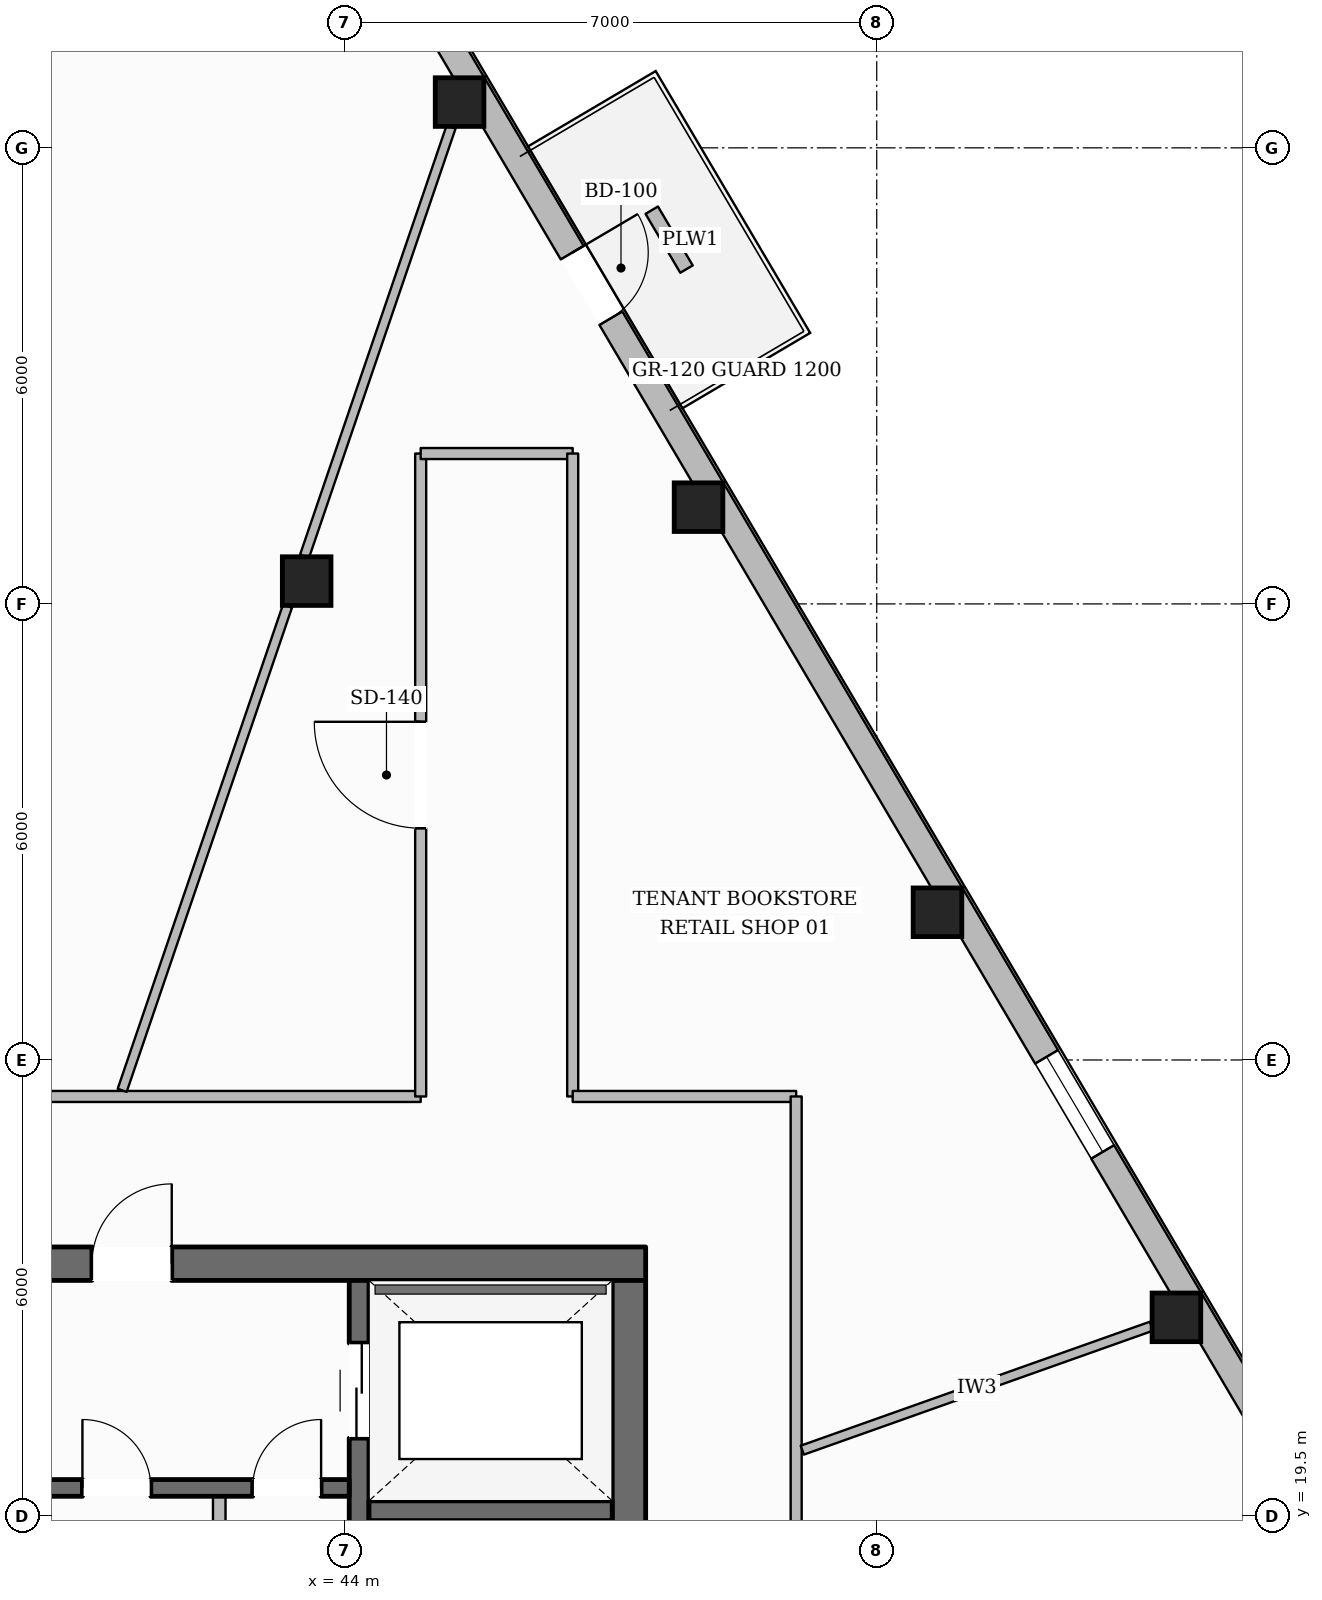
"""IFC4 building model, lengths in metres.
Left out: names, types, materials, properties, quantities, classifications, styles, units other than length and angle.
Written with IfcOpenShell. Run it as: python <this file> out.ifc"""

import sys

from ifc_helpers import new_model, si_unit, direction, frame, frame_2d, origin, origin_2d, place, context, subcontext, project, spatial, rectangle, hollow_rectangle, extrude, element, fill, save


model = new_model("IFC4")
c1 = context("Model", 3, precision=1e-05, world=origin(), true_north=direction((0.0, 1.0)))
c2 = subcontext(c1, "Body", "Model", "MODEL_VIEW")
j1 = project(units=[si_unit("LENGTHUNIT", "METRE"), si_unit("PLANEANGLEUNIT", "RADIAN")], contexts=[c1])
p1 = place(None, origin())
s1 = spatial("IfcSite", under=j1, at=p1, CompositionType="ELEMENT")
p2 = place(p1, origin())
s2 = spatial("IfcBuilding", under=s1, at=p2, CompositionType="ELEMENT")
p3 = place(p2, frame((0.0, 0.0, 199.65)))
s3 = spatial("IfcBuildingStorey", under=s2, at=p3, CompositionType="ELEMENT", Elevation=199.65)
p4 = place(p3, frame((28.04, 22.82, 0.0), z_axis=(0.0, 0.0, 1.0), x_axis=(1.0, 0.0, 0.0)))
e1 = element("IfcWall", 1, at=p4, inside=s3, PredefinedType="SOLIDWALL", context=c2, shape_type="SweptSolid", body=[
    extrude(rectangle(XDim=19.92, YDim=0.44, at=frame_2d((9.96, 0.0))), origin(), (0.0, 0.0, 1.0), 3.6),
])
p5 = place(p4, frame((6.235, 0.0, 0.0)))
e2 = element("IfcOpeningElement", 2, at=p5, cuts=e1, PredefinedType="OPENING", context=c2, shape_type="SweptSolid", body=[
    extrude(rectangle(XDim=1.05, YDim=2.15, at=frame_2d((0.525, 1.075))), frame((0.0, 0.23, 0.0), z_axis=(0.0, -1.0, 0.0), x_axis=(1.0, 0.0, 0.0)), (0.0, 0.0, 1.0), 0.46),
])
p6 = place(p4, frame((12.635, 0.0, 0.0)))
e3 = element("IfcOpeningElement", 3, at=p6, cuts=e1, PredefinedType="OPENING", context=c2, shape_type="SweptSolid", body=[
    extrude(rectangle(XDim=1.05, YDim=2.15, at=frame_2d((0.525, 1.075))), frame((0.0, 0.23, 0.0), z_axis=(0.0, -1.0, 0.0), x_axis=(1.0, 0.0, 0.0)), (0.0, 0.0, 1.0), 0.46),
])
p7 = place(p3, frame((47.74, 9.6, 0.0), z_axis=(0.0, 0.0, 1.0), x_axis=(0.0, 1.0, 0.0)))
e4 = element("IfcWall", 4, at=p7, inside=s3, PredefinedType="SOLIDWALL", context=c2, shape_type="SweptSolid", body=[
    extrude(rectangle(XDim=13.0, YDim=0.44, at=frame_2d((6.5, 0.0))), origin(), (0.0, 0.0, 1.0), 3.6),
])
p8 = place(p7, frame((0.2, 0.0, 0.0)))
e5 = element("IfcOpeningElement", 5, at=p8, cuts=e4, PredefinedType="OPENING", context=c2, shape_type="SweptSolid", body=[
    extrude(rectangle(XDim=1.1, YDim=2.15, at=frame_2d((0.55, 1.075))), frame((0.0, 0.23, 0.0), z_axis=(0.0, -1.0, 0.0), x_axis=(1.0, 0.0, 0.0)), (0.0, 0.0, 1.0), 0.46),
])
p9 = place(p7, frame((8.4, 0.0, 0.0)))
e6 = element("IfcOpeningElement", 6, at=p9, cuts=e4, PredefinedType="OPENING", context=c2, shape_type="SweptSolid", body=[
    extrude(rectangle(XDim=0.9, YDim=2.1, at=frame_2d((0.45, 1.05))), frame((0.0, 0.23, 0.0), z_axis=(0.0, -1.0, 0.0), x_axis=(1.0, 0.0, 0.0)), (0.0, 0.0, 1.0), 0.46),
])
p10 = place(p3, frame((44.19, 9.6, 0.0), z_axis=(0.0, 0.0, 1.0), x_axis=(0.0, 1.0, 0.0)))
e7 = element("IfcWall", 7, at=p10, inside=s3, PredefinedType="SHEAR", context=c2, shape_type="SweptSolid", body=[
    extrude(rectangle(XDim=13.0, YDim=0.26, at=frame_2d((6.5, 0.0))), origin(), (0.0, 0.0, 1.0), 3.6),
])
p11 = place(p10, frame((10.925, 0.0, 0.0)))
e8 = element("IfcOpeningElement", 8, at=p11, cuts=e7, PredefinedType="OPENING", context=c2, shape_type="SweptSolid", body=[
    extrude(rectangle(XDim=1.25, YDim=2.25, at=frame_2d((0.625, 1.125))), frame((0.0, 0.14, 0.0), z_axis=(0.0, -1.0, 0.0), x_axis=(1.0, 0.0, 0.0)), (0.0, 0.0, 1.0), 0.28),
])
p12 = place(p3, frame((44.32, 19.57, 0.0), z_axis=(0.0, 0.0, 1.0), x_axis=(1.0, 0.0, 0.0)))
e9 = element("IfcWall", 9, at=p12, inside=s3, PredefinedType="SHEAR", context=c2, shape_type="SweptSolid", body=[
    extrude(rectangle(XDim=3.2, YDim=0.26, at=frame_2d((1.6, 0.0))), origin(), (0.0, 0.0, 1.0), 3.6),
])
p13 = place(p3, frame((31.94, 19.87, 0.0), z_axis=(0.0, 0.0, 1.0), x_axis=(1.0, 0.0, 0.0)))
e10 = element("IfcWall", 10, at=p13, inside=s3, PredefinedType="SOLIDWALL", context=c2, shape_type="SweptSolid", body=[
    extrude(rectangle(XDim=12.12, YDim=0.22, at=frame_2d((6.06, 0.0))), origin(), (0.0, 0.0, 1.0), 3.6),
])
p14 = place(p13, frame((6.3, 0.0, 0.0)))
e11 = element("IfcOpeningElement", 11, at=p14, cuts=e10, PredefinedType="OPENING", context=c2, shape_type="SweptSolid", body=[
    extrude(rectangle(XDim=1.1, YDim=2.15, at=frame_2d((0.55, 1.075))), frame((0.0, 0.12, 0.0), z_axis=(0.0, -1.0, 0.0), x_axis=(1.0, 0.0, 0.0)), (0.0, 0.0, 1.0), 0.24),
])
p15 = place(p13, frame((8.61, 0.0, 0.0)))
e12 = element("IfcOpeningElement", 12, at=p15, cuts=e10, PredefinedType="OPENING", context=c2, shape_type="SweptSolid", body=[
    extrude(rectangle(XDim=0.9, YDim=2.1, at=frame_2d((0.45, 1.05))), frame((0.0, 0.12, 0.0), z_axis=(0.0, -1.0, 0.0), x_axis=(1.0, 0.0, 0.0)), (0.0, 0.0, 1.0), 0.24),
])
p16 = place(p13, frame((10.85, 0.0, 0.0)))
e13 = element("IfcOpeningElement", 13, at=p16, cuts=e10, PredefinedType="OPENING", context=c2, shape_type="SweptSolid", body=[
    extrude(rectangle(XDim=0.9, YDim=2.1, at=frame_2d((0.45, 1.05))), frame((0.0, 0.12, 0.0), z_axis=(0.0, -1.0, 0.0), x_axis=(1.0, 0.0, 0.0)), (0.0, 0.0, 1.0), 0.24),
])
for number, where, z_axis, x_axis in (
    (14, (54.943, 22.114, 0.0), (0.0, 0.0, 1.0), (1.0, 0.0, 0.0)),
    (15, (51.799, 27.443, 0.0), (0.0, 0.0, 1.0), (1.0, 0.0, 0.0)),
    (16, (48.656, 32.773, 0.0), (0.0, 0.0, 1.0), (1.0, 0.0, 0.0)),
    (17, (45.512, 38.102, 0.0), (0.0, 0.0, 1.0), (1.0, 0.0, 0.0)),
    (18, (43.5, 31.8, 0.0), (0.0, 0.0, 1.0), (1.0, 0.0, 0.0)),
):
    element("IfcColumn", number, at=place(p3, frame(where, z_axis=z_axis, x_axis=x_axis)), inside=s3, PredefinedType="COLUMN", context=c2, shape_type="SweptSolid", body=[
        extrude(hollow_rectangle(XDim=0.64, YDim=0.64, WallThickness=0.028, at=origin_2d()), origin(), (0.0, 0.0, 1.0), 3.6),
    ])
p17 = place(p3, frame((42.36, 43.976, 0.0), z_axis=(0.0, 0.0, 1.0), x_axis=(0.508076618563, -0.861311877121, 0.0)))
e19 = element("IfcWall", 19, at=p17, inside=s3, PredefinedType="STANDARD", context=c2, shape_type="SweptSolid", body=[
    extrude(rectangle(XDim=38.079, YDim=0.35, at=frame_2d((19.04, 0.0))), origin(), (0.0, 0.0, 1.0), 3.132),
])
p18 = place(p17, frame((9.12, 0.0, 0.0)))
e20 = element("IfcOpeningElement", 20, at=p18, cuts=e19, PredefinedType="OPENING", context=c2, shape_type="SweptSolid", body=[
    extrude(rectangle(XDim=1.0, YDim=2.2, at=frame_2d((0.5, 1.1))), frame((0.0, 0.185, 0.0), z_axis=(0.0, -1.0, 0.0), x_axis=(1.0, 0.0, 0.0)), (0.0, 0.0, 1.0), 0.37),
])
p19 = place(p17, frame((33.779, 0.0, 0.65)))
e21 = element("IfcOpeningElement", 21, at=p19, cuts=e19, PredefinedType="OPENING", context=c2, shape_type="SweptSolid", body=[
    extrude(rectangle(XDim=1.45, YDim=1.75, at=frame_2d((0.725, 0.875))), frame((0.0, 0.185, 0.0), z_axis=(0.0, -1.0, 0.0), x_axis=(1.0, 0.0, 0.0)), (0.0, 0.0, 1.0), 0.37),
])
p20 = place(p17, frame((27.591, 0.0, 0.65)))
e22 = element("IfcOpeningElement", 22, at=p20, cuts=e19, PredefinedType="OPENING", context=c2, shape_type="SweptSolid", body=[
    extrude(rectangle(XDim=1.45, YDim=1.75, at=frame_2d((0.725, 0.875))), frame((0.0, 0.185, 0.0), z_axis=(0.0, -1.0, 0.0), x_axis=(1.0, 0.0, 0.0)), (0.0, 0.0, 1.0), 0.37),
])
p21 = place(p17, frame((21.404, 0.0, 0.65)))
e23 = element("IfcOpeningElement", 23, at=p21, cuts=e19, PredefinedType="OPENING", context=c2, shape_type="SweptSolid", body=[
    extrude(rectangle(XDim=1.45, YDim=1.75, at=frame_2d((0.725, 0.875))), frame((0.0, 0.185, 0.0), z_axis=(0.0, -1.0, 0.0), x_axis=(1.0, 0.0, 0.0)), (0.0, 0.0, 1.0), 0.37),
])
p22 = place(p17, frame((2.842, 0.0, 0.65)))
e24 = element("IfcOpeningElement", 24, at=p22, cuts=e19, PredefinedType="OPENING", context=c2, shape_type="SweptSolid", body=[
    extrude(rectangle(XDim=1.45, YDim=1.75, at=frame_2d((0.725, 0.875))), frame((0.0, 0.185, 0.0), z_axis=(0.0, -1.0, 0.0), x_axis=(1.0, 0.0, 0.0)), (0.0, 0.0, 1.0), 0.37),
])
p23 = place(p3, frame((48.497, 35.905, 0.0), z_axis=(0.0, 0.0, 1.0), x_axis=(-0.508098554151, 0.861298937228, 0.0)))
e25 = element("IfcWall", 25, at=p23, inside=s3, PredefinedType="USERDEFINED", context=c2, shape_type="SweptSolid", body=[
    extrude(rectangle(XDim=0.9, YDim=0.19, at=frame_2d((0.45, 0.0))), origin(), (0.0, 0.0, 1.0), 0.5),
])
p24 = place(p3, frame((42.35, 16.56, 0.0), z_axis=(0.0, 0.0, 1.0), x_axis=(0.0, 1.0, 0.0)))
e26 = element("IfcWall", 26, at=p24, inside=s3, PredefinedType="PARTITIONING", context=c2, shape_type="SweptSolid", body=[
    extrude(rectangle(XDim=3.2, YDim=0.165, at=frame_2d((1.6, 0.0))), origin(), (0.0, 0.0, 1.0), 3.6),
])
p25 = place(p3, frame((31.0, 25.02, 0.0), z_axis=(0.0, 0.0, 1.0), x_axis=(1.0, 0.0, 0.0)))
e27 = element("IfcWall", 27, at=p25, inside=s3, PredefinedType="PARTITIONING", context=c2, shape_type="SweptSolid", body=[
    extrude(rectangle(XDim=14.0, YDim=0.145, at=frame_2d((7.0, 0.0))), origin(), (0.0, 0.0, 1.0), 3.6),
])
p26 = place(p25, frame((4.42, 0.0, 0.0)))
e28 = element("IfcOpeningElement", 28, at=p26, cuts=e27, PredefinedType="OPENING", context=c2, shape_type="SweptSolid", body=[
    extrude(rectangle(XDim=1.4, YDim=2.2, at=frame_2d((0.7, 1.1))), frame((0.0, 0.083, 0.0), z_axis=(0.0, -1.0, 0.0), x_axis=(1.0, 0.0, 0.0)), (0.0, 0.0, 1.0), 0.165),
])
p27 = place(p3, frame((45.0, 25.02, 0.0), z_axis=(0.0, 0.0, 1.0), x_axis=(0.0, 1.0, 0.0)))
e29 = element("IfcWall", 29, at=p27, inside=s3, PredefinedType="PARTITIONING", context=c2, shape_type="SweptSolid", body=[
    extrude(rectangle(XDim=8.458, YDim=0.145, at=frame_2d((4.229, 0.0))), origin(), (0.0, 0.0, 1.0), 3.6),
])
p28 = place(p27, frame((3.529, 0.0, 0.0)))
e30 = element("IfcOpeningElement", 30, at=p28, cuts=e29, PredefinedType="OPENING", context=c2, shape_type="SweptSolid", body=[
    extrude(rectangle(XDim=1.4, YDim=2.2, at=frame_2d((0.7, 1.1))), frame((0.0, 0.083, 0.0), z_axis=(0.0, -1.0, 0.0), x_axis=(1.0, 0.0, 0.0)), (0.0, 0.0, 1.0), 0.165),
])
p29 = place(p3, frame((45.0, 33.478, 0.0), z_axis=(0.0, 0.0, 1.0), x_axis=(1.0, 0.0, 0.0)))
e31 = element("IfcWall", 31, at=p29, inside=s3, PredefinedType="PARTITIONING", context=c2, shape_type="SweptSolid", body=[
    extrude(rectangle(XDim=2.0, YDim=0.145, at=frame_2d((1.0, 0.0))), origin(), (0.0, 0.0, 1.0), 3.6),
])
p30 = place(p3, frame((47.0, 33.478, 0.0), z_axis=(0.0, 0.0, 1.0), x_axis=(0.0, -1.0, 0.0)))
e32 = element("IfcWall", 32, at=p30, inside=s3, PredefinedType="PARTITIONING", context=c2, shape_type="SweptSolid", body=[
    extrude(rectangle(XDim=8.458, YDim=0.145, at=frame_2d((4.229, 0.0))), origin(), (0.0, 0.0, 1.0), 3.6),
])
p31 = place(p3, frame((47.0, 25.02, 0.0), z_axis=(0.0, 0.0, 1.0), x_axis=(1.0, 0.0, 0.0)))
e33 = element("IfcWall", 33, at=p31, inside=s3, PredefinedType="PARTITIONING", context=c2, shape_type="SweptSolid", body=[
    extrude(rectangle(XDim=2.94, YDim=0.145, at=frame_2d((1.47, 0.0))), origin(), (0.0, 0.0, 1.0), 3.6),
])
p32 = place(p3, frame((49.94, 25.02, 0.0), z_axis=(0.0, 0.0, 1.0), x_axis=(0.0, -1.0, 0.0)))
e34 = element("IfcWall", 34, at=p32, inside=s3, PredefinedType="PARTITIONING", context=c2, shape_type="SweptSolid", body=[
    extrude(rectangle(XDim=7.92, YDim=0.145, at=frame_2d((3.96, 0.0))), origin(), (0.0, 0.0, 1.0), 3.339),
])
p33 = place(p3, frame((50.021, 20.367, 0.0), z_axis=(0.0, 0.0, 1.0), x_axis=(0.942385990237, 0.334527495737, 0.0)))
e35 = element("IfcWall", 35, at=p33, inside=s3, PredefinedType="PARTITIONING", context=c2, shape_type="SweptSolid", body=[
    extrude(rectangle(XDim=4.875, YDim=0.125, at=frame_2d((2.438, 0.0))), origin(), (0.0, 0.0, 1.0), 3.6),
])
p34 = place(p3, frame((41.073, 25.101, 0.0), z_axis=(0.0, 0.0, 1.0), x_axis=(0.323105831647, 0.946362838216, 0.0)))
e36 = element("IfcWall", 36, at=p34, inside=s3, PredefinedType="PARTITIONING", context=c2, shape_type="SweptSolid", body=[
    extrude(rectangle(XDim=6.732, YDim=0.125, at=frame_2d((3.366, 0.0))), origin(), (0.0, 0.0, 1.0), 3.141),
])
p35 = place(p3, frame((43.472, 32.128, 0.0), z_axis=(0.0, 0.0, 1.0), x_axis=(0.323118824799, 0.946358402013, 0.0)))
e37 = element("IfcWall", 37, at=p35, inside=s3, PredefinedType="PARTITIONING", context=c2, shape_type="SweptSolid", body=[
    extrude(rectangle(XDim=5.966, YDim=0.125, at=frame_2d((2.983, 0.0))), origin(), (0.0, 0.0, 1.0), 3.6),
])
p36 = place(p18, origin())
e38 = element("IfcDoor", 38, at=p36, inside=s3, OperationType="SINGLE_SWING_LEFT", PredefinedType="DOOR", context=c2, shape_type="SweptSolid", body=[
    extrude(rectangle(XDim=1.0, YDim=2.2, at=frame_2d((0.5, 1.1))), frame((0.0, 0.025, 0.0), z_axis=(0.0, -1.0, 0.0), x_axis=(1.0, 0.0, 0.0)), (0.0, 0.0, 1.0), 0.05),
])
fill(e20, e38)
p37 = place(p21, origin())
e39 = element("IfcWindow", 39, at=p37, inside=s3, PartitioningType="SINGLE_PANEL", PredefinedType="WINDOW", context=c2, shape_type="SweptSolid", body=[
    extrude(rectangle(XDim=1.45, YDim=1.75, at=frame_2d((0.725, 0.875))), frame((0.0, 0.03, 0.0), z_axis=(0.0, -1.0, 0.0), x_axis=(1.0, 0.0, 0.0)), (0.0, 0.0, 1.0), 0.06),
])
fill(e23, e39)
p38 = place(p6, origin())
e40 = element("IfcDoor", 40, at=p38, inside=s3, OperationType="SINGLE_SWING_RIGHT", PredefinedType="DOOR", context=c2, shape_type="SweptSolid", body=[
    extrude(rectangle(XDim=1.05, YDim=2.15, at=frame_2d((0.525, 1.075))), frame((0.0, 0.025, 0.0), z_axis=(0.0, -1.0, 0.0), x_axis=(1.0, 0.0, 0.0)), (0.0, 0.0, 1.0), 0.05),
])
fill(e3, e40)
p39 = place(p11, origin())
e41 = element("IfcDoor", 41, at=p39, inside=s3, OperationType="DOUBLE_DOOR_SLIDING", PredefinedType="DOOR", context=c2, shape_type="SweptSolid", body=[
    extrude(rectangle(XDim=1.25, YDim=2.25, at=frame_2d((0.625, 1.125))), frame((0.0, 0.025, 0.0), z_axis=(0.0, -1.0, 0.0), x_axis=(1.0, 0.0, 0.0)), (0.0, 0.0, 1.0), 0.05),
])
fill(e8, e41)
p40 = place(p15, origin())
e42 = element("IfcDoor", 42, at=p40, inside=s3, OperationType="SINGLE_SWING_LEFT", PredefinedType="DOOR", context=c2, shape_type="SweptSolid", body=[
    extrude(rectangle(XDim=0.9, YDim=2.1, at=frame_2d((0.45, 1.05))), frame((0.0, 0.025, 0.0), z_axis=(0.0, -1.0, 0.0), x_axis=(1.0, 0.0, 0.0)), (0.0, 0.0, 1.0), 0.05),
])
fill(e12, e42)
p41 = place(p16, origin())
e43 = element("IfcDoor", 43, at=p41, inside=s3, OperationType="SINGLE_SWING_RIGHT", PredefinedType="DOOR", context=c2, shape_type="SweptSolid", body=[
    extrude(rectangle(XDim=0.9, YDim=2.1, at=frame_2d((0.45, 1.05))), frame((0.0, 0.025, 0.0), z_axis=(0.0, -1.0, 0.0), x_axis=(1.0, 0.0, 0.0)), (0.0, 0.0, 1.0), 0.05),
])
fill(e13, e43)
p42 = place(p28, origin())
e44 = element("IfcDoor", 44, at=p42, inside=s3, OperationType="SINGLE_SWING_RIGHT", PredefinedType="DOOR", context=c2, shape_type="SweptSolid", body=[
    extrude(rectangle(XDim=1.4, YDim=2.2, at=frame_2d((0.7, 1.1))), frame((0.0, 0.025, 0.0), z_axis=(0.0, -1.0, 0.0), x_axis=(1.0, 0.0, 0.0)), (0.0, 0.0, 1.0), 0.05),
])
fill(e30, e44)
save(model, sys.argv[1])
